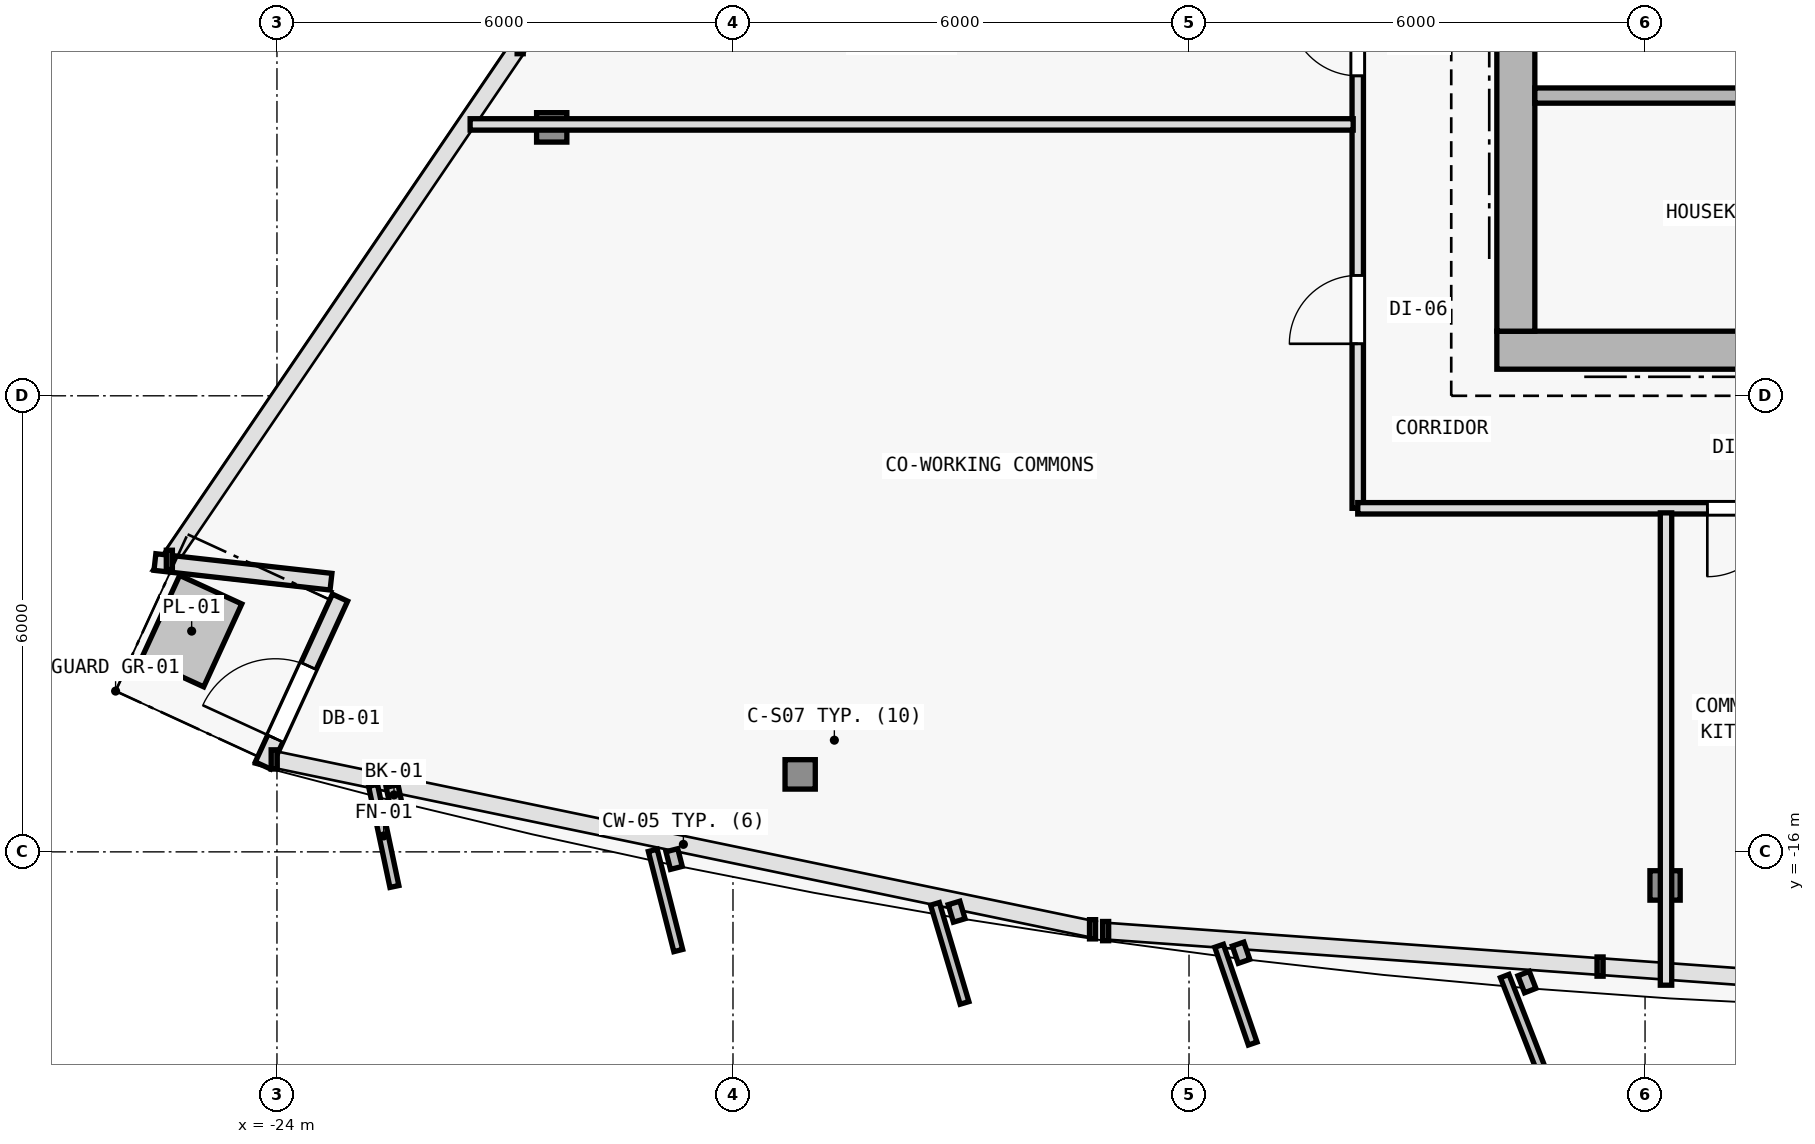
"""IFC4 building model, lengths in metres.
Left out: names, types, materials, properties, quantities, classifications, styles, units other than length and angle.
Written with IfcOpenShell. Run it as: python <this file> out.ifc"""

import sys

from ifc_helpers import new_model, si_unit, direction, frame, frame_2d, origin, origin_2d, place, context, subcontext, project, spatial, rectangle, i_section, extrude, element, fill, save


model = new_model("IFC4")
c1 = context("Model", 3, precision=1e-05, world=origin(), true_north=direction((0.0, 1.0)))
c2 = subcontext(c1, "Body", "Model", "MODEL_VIEW")
j1 = project(units=[si_unit("LENGTHUNIT", "METRE"), si_unit("PLANEANGLEUNIT", "RADIAN")], contexts=[c1])
p1 = place(None, origin())
s1 = spatial("IfcSite", under=j1, at=p1, CompositionType="ELEMENT")
p2 = place(p1, origin())
s2 = spatial("IfcBuilding", under=s1, at=p2, CompositionType="ELEMENT")
p3 = place(p2, frame((0.0, 0.0, 190.2)))
s3 = spatial("IfcBuildingStorey", under=s2, at=p3, CompositionType="ELEMENT", Elevation=190.2)
p4 = place(p3, frame((-7.7, -9.4, 0.0), z_axis=(0.0, 0.0, 1.0), x_axis=(1.0, 0.0, 0.0)))
e1 = element("IfcColumn", 1, at=p4, inside=s3, PredefinedType="COLUMN", context=c2, shape_type="SweptSolid", body=[
    extrude(i_section(OverallWidth=0.404, OverallDepth=0.407, WebThickness=0.017, FlangeThickness=0.028, FilletRadius=0.015, at=origin_2d()), origin(), (0.0, 0.0, 1.0), 4.5),
])
p5 = place(p3, frame((-17.116, -14.981, 0.006), z_axis=(0.016470879208, 0.026799153299, 0.999505135315), x_axis=(-0.851954850327, 0.523615252838, 0.0)))
e2 = element("IfcColumn", 2, at=p5, inside=s3, PredefinedType="COLUMN", context=c2, shape_type="SweptSolid", body=[
    extrude(i_section(OverallWidth=0.398, OverallDepth=0.387, WebThickness=0.013, FlangeThickness=0.022, FilletRadius=0.015, at=origin_2d()), origin(), (0.0, 0.0, 1.0), 4.491),
])
p6 = place(p3, frame((-5.737, -16.442, 0.006), z_axis=(0.005490750085, 0.028160480633, 0.999588334763), x_axis=(-0.981516643497, 0.191376797284, 0.0)))
e3 = element("IfcColumn", 3, at=p6, inside=s3, PredefinedType="COLUMN", context=c2, shape_type="SweptSolid", body=[
    extrude(i_section(OverallWidth=0.398, OverallDepth=0.387, WebThickness=0.013, FlangeThickness=0.022, FilletRadius=0.015, at=origin_2d()), origin(), (0.0, 0.0, 1.0), 4.491),
])
p7 = place(p3, frame((-20.385, -6.469, 0.006), z_axis=(0.020170177998, 0.017288723999, 0.999647069691), x_axis=(-0.650791373456, 0.759256602365, 0.0)))
e4 = element("IfcColumn", 4, at=p7, inside=s3, PredefinedType="COLUMN", context=c2, shape_type="SweptSolid", body=[
    extrude(i_section(OverallWidth=0.398, OverallDepth=0.387, WebThickness=0.013, FlangeThickness=0.022, FilletRadius=0.015, at=origin_2d()), origin(), (0.0, 0.0, 1.0), 4.49),
])
p8 = place(p3, frame((-23.289, -12.446, 0.0), z_axis=(0.0, 0.0, 1.0), x_axis=(-0.993829972675, 0.110914315635, 0.0)))
e5 = element("IfcWall", 5, at=p8, inside=s3, PredefinedType="SOLIDWALL", context=c2, shape_type="SweptSolid", body=[
    extrude(rectangle(XDim=2.331, YDim=0.22, at=frame_2d((1.166, 0.0))), origin(), (0.0, 0.0, 1.0), 4.25),
])
p9 = place(p3, frame((-24.185, -14.863, 0.0), z_axis=(0.0, 0.0, 1.0), x_axis=(0.417509141111, 0.90867272276, 0.0)))
e6 = element("IfcWall", 6, at=p9, inside=s3, PredefinedType="SOLIDWALL", context=c2, shape_type="SweptSolid", body=[
    extrude(rectangle(XDim=2.43, YDim=0.22, at=frame_2d((1.215, 0.0))), origin(), (0.0, 0.0, 1.0), 4.25),
])
p10 = place(p9, frame((0.39, 0.0, 0.0)))
e7 = element("IfcOpeningElement", 7, at=p10, cuts=e6, PredefinedType="OPENING", context=c2, shape_type="SweptSolid", body=[
    extrude(rectangle(XDim=1.05, YDim=2.15, at=frame_2d((0.525, 1.075))), frame((0.0, 0.12, 0.0), z_axis=(0.0, -1.0, 0.0), x_axis=(1.0, 0.0, 0.0)), (0.0, 0.0, 1.0), 0.24),
])
p11 = place(p3, frame((-7.95, -9.4, 0.0), z_axis=(0.0, 0.0, 1.0), x_axis=(1.0, 0.0, 0.0)))
e8 = element("IfcWall", 8, at=p11, inside=s3, PredefinedType="SHEAR", context=c2, shape_type="SweptSolid", body=[
    extrude(rectangle(XDim=15.9, YDim=0.5, at=frame_2d((7.95, 0.0))), origin(), (0.0, 0.0, 1.0), 4.25),
])
p12 = place(p11, frame((9.6, 0.0, 0.0)))
e9 = element("IfcOpeningElement", 9, at=p12, cuts=e8, PredefinedType="OPENING", context=c2, shape_type="SweptSolid", body=[
    extrude(rectangle(XDim=1.5, YDim=2.2, at=frame_2d((0.75, 1.1))), frame((0.0, 0.26, 0.0), z_axis=(0.0, -1.0, 0.0), x_axis=(1.0, 0.0, 0.0)), (0.0, 0.0, 1.0), 0.52),
])
p13 = place(p3, frame((-7.7, -9.15, 0.0), z_axis=(0.0, 0.0, 1.0), x_axis=(0.0, 1.0, 0.0)))
e10 = element("IfcWall", 10, at=p13, inside=s3, PredefinedType="SHEAR", context=c2, shape_type="SweptSolid", body=[
    extrude(rectangle(XDim=19.1, YDim=0.5, at=frame_2d((9.55, 0.0))), origin(), (0.0, 0.0, 1.0), 4.25),
])
p14 = place(p13, frame((12.7, 0.0, 0.0)))
e11 = element("IfcOpeningElement", 11, at=p14, cuts=e10, PredefinedType="OPENING", context=c2, shape_type="SweptSolid", body=[
    extrude(rectangle(XDim=1.1, YDim=2.15, at=frame_2d((0.55, 1.075))), frame((0.0, 0.26, 0.0), z_axis=(0.0, -1.0, 0.0), x_axis=(1.0, 0.0, 0.0)), (0.0, 0.0, 1.0), 0.52),
])
p15 = place(p3, frame((-7.45, -6.05, 0.0), z_axis=(0.0, 0.0, 1.0), x_axis=(1.0, 0.0, 0.0)))
e12 = element("IfcWall", 12, at=p15, inside=s3, PredefinedType="SOLIDWALL", context=c2, shape_type="SweptSolid", body=[
    extrude(rectangle(XDim=3.4, YDim=0.2, at=frame_2d((1.7, 0.0))), origin(), (0.0, 0.0, 1.0), 4.25),
])
p16 = place(p3, frame((-9.78, -11.48, 0.0), z_axis=(0.0, 0.0, 1.0), x_axis=(0.0, 1.0, 0.0)))
e13 = element("IfcWall", 13, at=p16, inside=s3, PredefinedType="PARTITIONING", context=c2, shape_type="SweptSolid", body=[
    extrude(rectangle(XDim=19.706, YDim=0.15, at=frame_2d((9.853, 0.0))), origin(), (0.0, 0.0, 1.0), 3.725),
])
p17 = place(p16, frame((10.595, 0.0, 0.0)))
e14 = element("IfcOpeningElement", 14, at=p17, cuts=e13, PredefinedType="OPENING", context=c2, shape_type="SweptSolid", body=[
    extrude(rectangle(XDim=0.9, YDim=2.1, at=frame_2d((0.45, 1.05))), frame((0.0, 0.085, 0.0), z_axis=(0.0, -1.0, 0.0), x_axis=(1.0, 0.0, 0.0)), (0.0, 0.0, 1.0), 0.17),
])
p18 = place(p16, frame((8.067, 0.0, 0.0)))
e15 = element("IfcOpeningElement", 15, at=p18, cuts=e13, PredefinedType="OPENING", context=c2, shape_type="SweptSolid", body=[
    extrude(rectangle(XDim=0.9, YDim=2.1, at=frame_2d((0.45, 1.05))), frame((0.0, 0.085, 0.0), z_axis=(0.0, -1.0, 0.0), x_axis=(1.0, 0.0, 0.0)), (0.0, 0.0, 1.0), 0.17),
])
p19 = place(p16, frame((5.689, 0.0, 0.0)))
e16 = element("IfcOpeningElement", 16, at=p19, cuts=e13, PredefinedType="OPENING", context=c2, shape_type="SweptSolid", body=[
    extrude(rectangle(XDim=0.9, YDim=2.1, at=frame_2d((0.45, 1.05))), frame((0.0, 0.085, 0.0), z_axis=(0.0, -1.0, 0.0), x_axis=(1.0, 0.0, 0.0)), (0.0, 0.0, 1.0), 0.17),
])
p20 = place(p16, frame((2.164, 0.0, 0.0)))
e17 = element("IfcOpeningElement", 17, at=p20, cuts=e13, PredefinedType="OPENING", context=c2, shape_type="SweptSolid", body=[
    extrude(rectangle(XDim=0.9, YDim=2.1, at=frame_2d((0.45, 1.05))), frame((0.0, 0.085, 0.0), z_axis=(0.0, -1.0, 0.0), x_axis=(1.0, 0.0, 0.0)), (0.0, 0.0, 1.0), 0.17),
])
p21 = place(p16, frame((13.273, 0.0, 0.0)))
e18 = element("IfcOpeningElement", 18, at=p21, cuts=e13, PredefinedType="OPENING", context=c2, shape_type="SweptSolid", body=[
    extrude(rectangle(XDim=0.9, YDim=2.1, at=frame_2d((0.45, 1.05))), frame((0.0, 0.085, 0.0), z_axis=(0.0, -1.0, 0.0), x_axis=(1.0, 0.0, 0.0)), (0.0, 0.0, 1.0), 0.17),
])
p22 = place(p3, frame((9.78, -11.48, 0.0), z_axis=(0.0, 0.0, 1.0), x_axis=(-1.0, 0.0, 0.0)))
e19 = element("IfcWall", 19, at=p22, inside=s3, PredefinedType="PARTITIONING", context=c2, shape_type="SweptSolid", body=[
    extrude(rectangle(XDim=19.56, YDim=0.15, at=frame_2d((9.78, 0.0))), origin(), (0.0, 0.0, 1.0), 3.675),
])
p23 = place(p22, frame((14.061, 0.0, 0.0)))
e20 = element("IfcOpeningElement", 20, at=p23, cuts=e19, PredefinedType="OPENING", context=c2, shape_type="SweptSolid", body=[
    extrude(rectangle(XDim=0.9, YDim=2.1, at=frame_2d((0.45, 1.05))), frame((0.0, 0.085, 0.0), z_axis=(0.0, -1.0, 0.0), x_axis=(1.0, 0.0, 0.0)), (0.0, 0.0, 1.0), 0.17),
])
p24 = place(p22, frame((11.573, 0.0, 0.0)))
e21 = element("IfcOpeningElement", 21, at=p24, cuts=e19, PredefinedType="OPENING", context=c2, shape_type="SweptSolid", body=[
    extrude(rectangle(XDim=0.9, YDim=2.1, at=frame_2d((0.45, 1.05))), frame((0.0, 0.085, 0.0), z_axis=(0.0, -1.0, 0.0), x_axis=(1.0, 0.0, 0.0)), (0.0, 0.0, 1.0), 0.17),
])
p25 = place(p22, frame((8.062, 0.0, 0.0)))
e22 = element("IfcOpeningElement", 22, at=p25, cuts=e19, PredefinedType="OPENING", context=c2, shape_type="SweptSolid", body=[
    extrude(rectangle(XDim=0.9, YDim=2.1, at=frame_2d((0.45, 1.05))), frame((0.0, 0.085, 0.0), z_axis=(0.0, -1.0, 0.0), x_axis=(1.0, 0.0, 0.0)), (0.0, 0.0, 1.0), 0.17),
])
p26 = place(p22, frame((4.824, 0.0, 0.0)))
e23 = element("IfcOpeningElement", 23, at=p26, cuts=e19, PredefinedType="OPENING", context=c2, shape_type="SweptSolid", body=[
    extrude(rectangle(XDim=0.9, YDim=2.1, at=frame_2d((0.45, 1.05))), frame((0.0, 0.085, 0.0), z_axis=(0.0, -1.0, 0.0), x_axis=(1.0, 0.0, 0.0)), (0.0, 0.0, 1.0), 0.17),
])
p27 = place(p22, frame((1.667, 0.0, 0.0)))
e24 = element("IfcOpeningElement", 24, at=p27, cuts=e19, PredefinedType="OPENING", context=c2, shape_type="SweptSolid", body=[
    extrude(rectangle(XDim=0.9, YDim=2.1, at=frame_2d((0.45, 1.05))), frame((0.0, 0.085, 0.0), z_axis=(0.0, -1.0, 0.0), x_axis=(1.0, 0.0, 0.0)), (0.0, 0.0, 1.0), 0.17),
])
p28 = place(p3, frame((-5.724, -11.54, 0.0), z_axis=(0.0, 0.0, 1.0), x_axis=(0.0, -1.0, 0.0)))
e25 = element("IfcWall", 25, at=p28, inside=s3, PredefinedType="PARTITIONING", context=c2, shape_type="SweptSolid", body=[
    extrude(rectangle(XDim=6.214, YDim=0.15, at=frame_2d((3.107, 0.0))), origin(), (0.0, 0.0, 1.0), 3.835),
])
p29 = place(p3, frame((-9.84, -6.43, 0.0), z_axis=(0.0, 0.0, 1.0), x_axis=(-1.0, 0.0, 0.0)))
e26 = element("IfcWall", 26, at=p29, inside=s3, PredefinedType="PARTITIONING", context=c2, shape_type="SweptSolid", body=[
    extrude(rectangle(XDim=11.618, YDim=0.15, at=frame_2d((5.809, 0.0))), origin(), (0.0, 0.0, 1.0), 3.725),
])
p30 = place(p10, origin())
e27 = element("IfcDoor", 27, at=p30, inside=s3, OperationType="SINGLE_SWING_LEFT", PredefinedType="DOOR", context=c2, shape_type="SweptSolid", body=[
    extrude(rectangle(XDim=1.05, YDim=2.15, at=frame_2d((0.525, 1.075))), frame((0.0, 0.025, 0.0), z_axis=(0.0, -1.0, 0.0), x_axis=(1.0, 0.0, 0.0)), (0.0, 0.0, 1.0), 0.05),
])
fill(e7, e27)
p31 = place(p19, origin())
e28 = element("IfcDoor", 28, at=p31, inside=s3, OperationType="SINGLE_SWING_RIGHT", PredefinedType="DOOR", context=c2, shape_type="SweptSolid", body=[
    extrude(rectangle(XDim=0.9, YDim=2.1, at=frame_2d((0.45, 1.05))), frame((0.0, 0.025, 0.0), z_axis=(0.0, -1.0, 0.0), x_axis=(1.0, 0.0, 0.0)), (0.0, 0.0, 1.0), 0.05),
])
fill(e16, e28)
p32 = place(p20, origin())
e29 = element("IfcDoor", 29, at=p32, inside=s3, OperationType="SINGLE_SWING_LEFT", PredefinedType="DOOR", context=c2, shape_type="SweptSolid", body=[
    extrude(rectangle(XDim=0.9, YDim=2.1, at=frame_2d((0.45, 1.05))), frame((0.0, 0.025, 0.0), z_axis=(0.0, -1.0, 0.0), x_axis=(1.0, 0.0, 0.0)), (0.0, 0.0, 1.0), 0.05),
])
fill(e17, e29)
p33 = place(p23, origin())
e30 = element("IfcDoor", 30, at=p33, inside=s3, OperationType="SINGLE_SWING_RIGHT", PredefinedType="DOOR", context=c2, shape_type="SweptSolid", body=[
    extrude(rectangle(XDim=0.9, YDim=2.1, at=frame_2d((0.45, 1.05))), frame((0.0, 0.025, 0.0), z_axis=(0.0, -1.0, 0.0), x_axis=(1.0, 0.0, 0.0)), (0.0, 0.0, 1.0), 0.05),
])
fill(e20, e30)
save(model, sys.argv[1])
